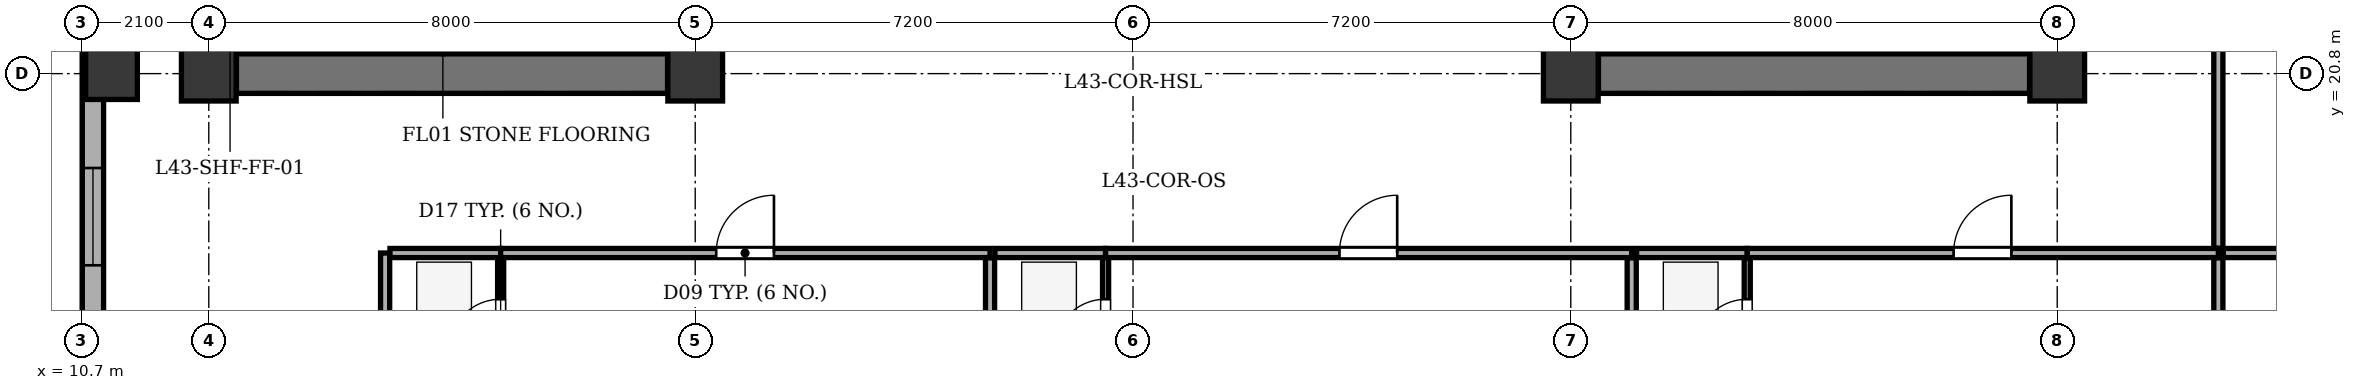
"""IFC4 building model, lengths in metres.
Left out: names, types, materials, properties, quantities, classifications, styles, units other than length and angle.
Written with IfcOpenShell. Run it as: python <this file> out.ifc"""

import sys

from ifc_helpers import new_model, si_unit, direction, frame, frame_2d, origin, origin_2d, place, context, subcontext, project, spatial, rectangle, extrude, element, fill, save


model = new_model("IFC4")
c1 = context("Model", 3, precision=1e-05, world=origin(), true_north=direction((0.0, 1.0)))
c2 = subcontext(c1, "Body", "Model", "MODEL_VIEW")
j1 = project(units=[si_unit("LENGTHUNIT", "METRE"), si_unit("PLANEANGLEUNIT", "RADIAN")], contexts=[c1])
p1 = place(None, origin())
s1 = spatial("IfcSite", under=j1, at=p1, CompositionType="ELEMENT")
p2 = place(p1, origin())
s2 = spatial("IfcBuilding", under=s1, at=p2, CompositionType="ELEMENT")
p3 = place(p2, frame((0.0, 0.0, 169.3)))
s3 = spatial("IfcBuildingStorey", under=s2, at=p3, CompositionType="ELEMENT", Elevation=169.3)
for number, where, z_axis, x_axis in (
    (1, (12.8, 20.8, 0.0), (0.0, 0.0, 1.0), (1.0, 0.0, 0.0)),
    (2, (20.8, 20.8, 0.0), (0.0, 0.0, 1.0), (1.0, 0.0, 0.0)),
    (3, (35.2, 20.8, 0.0), (0.0, 0.0, 1.0), (1.0, 0.0, 0.0)),
    (4, (43.2, 20.8, 0.0), (0.0, 0.0, 1.0), (1.0, 0.0, 0.0)),
):
    element("IfcColumn", number, at=place(p3, frame(where, z_axis=z_axis, x_axis=x_axis)), inside=s3, PredefinedType="COLUMN", context=c2, shape_type="SweptSolid", body=[
        extrude(rectangle(XDim=0.9, YDim=0.9, at=origin_2d()), origin(), (0.0, 0.0, 1.0), 3.5),
    ])
p4 = place(p3, frame((11.2, 20.8, 0.0), z_axis=(0.0, 0.0, 1.0), x_axis=(1.0, 0.0, 0.0)))
e5 = element("IfcColumn", 5, at=p4, inside=s3, PredefinedType="COLUMN", context=c2, shape_type="SweptSolid", body=[
    extrude(rectangle(XDim=0.85, YDim=0.85, at=origin_2d()), origin(), (0.0, 0.0, 1.0), 3.5),
])
p5 = place(p3, frame((10.895, 12.9, 0.0), z_axis=(0.0, 0.0, 1.0), x_axis=(0.0, 1.0, 0.0)))
e6 = element("IfcWall", 6, at=p5, inside=s3, PredefinedType="STANDARD", context=c2, shape_type="SweptSolid", body=[
    extrude(rectangle(XDim=35.0, YDim=0.35, at=frame_2d((17.5, 0.0))), origin(), (0.0, 0.0, 1.0), 2.785),
])
p6 = place(p5, frame((1.652, 0.0, 0.75)))
e7 = element("IfcOpeningElement", 7, at=p6, cuts=e6, PredefinedType="OPENING", context=c2, shape_type="SweptSolid", body=[
    extrude(rectangle(XDim=1.6, YDim=1.75, at=frame_2d((0.8, 0.875))), frame((0.0, 0.185, 0.0), z_axis=(0.0, -1.0, 0.0), x_axis=(1.0, 0.0, 0.0)), (0.0, 0.0, 1.0), 0.37),
])
p7 = place(p5, frame((4.748, 0.0, 0.75)))
e8 = element("IfcOpeningElement", 8, at=p7, cuts=e6, PredefinedType="OPENING", context=c2, shape_type="SweptSolid", body=[
    extrude(rectangle(XDim=1.6, YDim=1.75, at=frame_2d((0.8, 0.875))), frame((0.0, 0.185, 0.0), z_axis=(0.0, -1.0, 0.0), x_axis=(1.0, 0.0, 0.0)), (0.0, 0.0, 1.0), 0.37),
])
p8 = place(p5, frame((10.752, 0.0, 0.75)))
e9 = element("IfcOpeningElement", 9, at=p8, cuts=e6, PredefinedType="OPENING", context=c2, shape_type="SweptSolid", body=[
    extrude(rectangle(XDim=1.6, YDim=1.75, at=frame_2d((0.8, 0.875))), frame((0.0, 0.185, 0.0), z_axis=(0.0, -1.0, 0.0), x_axis=(1.0, 0.0, 0.0)), (0.0, 0.0, 1.0), 0.37),
])
p9 = place(p5, frame((15.998, 0.0, 0.75)))
e10 = element("IfcOpeningElement", 10, at=p9, cuts=e6, PredefinedType="OPENING", context=c2, shape_type="SweptSolid", body=[
    extrude(rectangle(XDim=2.1, YDim=1.75, at=frame_2d((1.05, 0.875))), frame((0.0, 0.185, 0.0), z_axis=(0.0, -1.0, 0.0), x_axis=(1.0, 0.0, 0.0)), (0.0, 0.0, 1.0), 0.37),
])
p10 = place(p5, frame((23.916, 0.0, 0.75)))
e11 = element("IfcOpeningElement", 11, at=p10, cuts=e6, PredefinedType="OPENING", context=c2, shape_type="SweptSolid", body=[
    extrude(rectangle(XDim=1.6, YDim=1.75, at=frame_2d((0.8, 0.875))), frame((0.0, 0.185, 0.0), z_axis=(0.0, -1.0, 0.0), x_axis=(1.0, 0.0, 0.0)), (0.0, 0.0, 1.0), 0.37),
])
p11 = place(p5, frame((29.834, 0.0, 0.75)))
e12 = element("IfcOpeningElement", 12, at=p11, cuts=e6, PredefinedType="OPENING", context=c2, shape_type="SweptSolid", body=[
    extrude(rectangle(XDim=2.1, YDim=1.75, at=frame_2d((1.05, 0.875))), frame((0.0, 0.185, 0.0), z_axis=(0.0, -1.0, 0.0), x_axis=(1.0, 0.0, 0.0)), (0.0, 0.0, 1.0), 0.37),
])
p12 = place(p3, frame((13.255, 20.8, 0.0), z_axis=(0.0, 0.0, 1.0), x_axis=(1.0, 0.0, 0.0)))
e13 = element("IfcWall", 13, at=p12, inside=s3, PredefinedType="SHEAR", context=c2, shape_type="SweptSolid", body=[
    extrude(rectangle(XDim=7.09, YDim=0.65, at=frame_2d((3.545, 0.0))), origin(), (0.0, 0.0, 1.0), 3.2),
])
p13 = place(p3, frame((16.435, 21.135, 0.0), z_axis=(0.0, 0.0, 1.0), x_axis=(0.0, 1.0, 0.0)))
e14 = element("IfcWall", 14, at=p13, inside=s3, PredefinedType="SHEAR", context=c2, shape_type="SweptSolid", body=[
    extrude(rectangle(XDim=12.13, YDim=0.25, at=frame_2d((6.065, 0.0))), origin(), (0.0, 0.0, 1.0), 3.2),
])
p14 = place(p13, frame((0.515, 0.0, 0.0)))
e15 = element("IfcOpeningElement", 15, at=p14, cuts=e14, PredefinedType="OPENING", context=c2, shape_type="SweptSolid", body=[
    extrude(rectangle(XDim=1.2, YDim=2.15, at=frame_2d((0.6, 1.075))), frame((0.0, 0.135, 0.0), z_axis=(0.0, -1.0, 0.0), x_axis=(1.0, 0.0, 0.0)), (0.0, 0.0, 1.0), 0.27),
])
p15 = place(p13, frame((2.665, 0.0, 0.0)))
e16 = element("IfcOpeningElement", 16, at=p15, cuts=e14, PredefinedType="OPENING", context=c2, shape_type="SweptSolid", body=[
    extrude(rectangle(XDim=1.15, YDim=2.15, at=frame_2d((0.575, 1.075))), frame((0.0, 0.135, 0.0), z_axis=(0.0, -1.0, 0.0), x_axis=(1.0, 0.0, 0.0)), (0.0, 0.0, 1.0), 0.27),
])
p16 = place(p3, frame((35.655, 20.8, 0.0), z_axis=(0.0, 0.0, 1.0), x_axis=(1.0, 0.0, 0.0)))
e17 = element("IfcWall", 17, at=p16, inside=s3, PredefinedType="SHEAR", context=c2, shape_type="SweptSolid", body=[
    extrude(rectangle(XDim=7.09, YDim=0.65, at=frame_2d((3.545, 0.0))), origin(), (0.0, 0.0, 1.0), 3.2),
])
p17 = place(p3, frame((39.565, 21.135, 0.0), z_axis=(0.0, 0.0, 1.0), x_axis=(0.0, 1.0, 0.0)))
e18 = element("IfcWall", 18, at=p17, inside=s3, PredefinedType="SHEAR", context=c2, shape_type="SweptSolid", body=[
    extrude(rectangle(XDim=12.13, YDim=0.25, at=frame_2d((6.065, 0.0))), origin(), (0.0, 0.0, 1.0), 3.2),
])
p18 = place(p17, frame((0.515, 0.0, 0.0)))
e19 = element("IfcOpeningElement", 19, at=p18, cuts=e18, PredefinedType="OPENING", context=c2, shape_type="SweptSolid", body=[
    extrude(rectangle(XDim=1.2, YDim=2.15, at=frame_2d((0.6, 1.075))), frame((0.0, 0.135, 0.0), z_axis=(0.0, -1.0, 0.0), x_axis=(1.0, 0.0, 0.0)), (0.0, 0.0, 1.0), 0.27),
])
p19 = place(p17, frame((2.665, 0.0, 0.0)))
e20 = element("IfcOpeningElement", 20, at=p19, cuts=e18, PredefinedType="OPENING", context=c2, shape_type="SweptSolid", body=[
    extrude(rectangle(XDim=1.15, YDim=2.15, at=frame_2d((0.575, 1.075))), frame((0.0, 0.135, 0.0), z_axis=(0.0, -1.0, 0.0), x_axis=(1.0, 0.0, 0.0)), (0.0, 0.0, 1.0), 0.27),
])
p20 = place(p3, frame((15.7, 8.275, 0.0), z_axis=(0.0, 0.0, 1.0), x_axis=(0.0, 1.0, 0.0)))
e21 = element("IfcWall", 21, at=p20, inside=s3, PredefinedType="PARTITIONING", context=c2, shape_type="SweptSolid", body=[
    extrude(rectangle(XDim=9.575, YDim=0.15, at=frame_2d((4.788, 0.0))), origin(), (0.0, 0.0, 1.0), 3.2),
])
p21 = place(p3, frame((15.78, 17.85, 0.0), z_axis=(0.0, 0.0, 1.0), x_axis=(1.0, 0.0, 0.0)))
e22 = element("IfcWall", 22, at=p21, inside=s3, PredefinedType="PARTITIONING", context=c2, shape_type="SweptSolid", body=[
    extrude(rectangle(XDim=1.82, YDim=0.15, at=frame_2d((0.91, 0.0))), origin(), (0.0, 0.0, 1.0), 3.2),
])
p22 = place(p3, frame((17.6, 17.85, 0.0), z_axis=(0.0, 0.0, 1.0), x_axis=(1.0, 0.0, 0.0)))
e23 = element("IfcWall", 23, at=p22, inside=s3, PredefinedType="PARTITIONING", context=c2, shape_type="SweptSolid", body=[
    extrude(rectangle(XDim=8.049, YDim=0.15, at=frame_2d((4.024, 0.0))), origin(), (0.0, 0.0, 1.0), 3.2),
])
p23 = place(p22, frame((3.545, 0.0, 0.0)))
e24 = element("IfcOpeningElement", 24, at=p23, cuts=e23, PredefinedType="OPENING", context=c2, shape_type="SweptSolid", body=[
    extrude(rectangle(XDim=0.95, YDim=2.1, at=frame_2d((0.475, 1.05))), frame((0.0, 0.085, 0.0), z_axis=(0.0, -1.0, 0.0), x_axis=(1.0, 0.0, 0.0)), (0.0, 0.0, 1.0), 0.17),
])
p24 = place(p3, frame((17.6, 15.52, 0.0), z_axis=(0.0, 0.0, 1.0), x_axis=(0.0, 1.0, 0.0)))
e25 = element("IfcWall", 25, at=p24, inside=s3, PredefinedType="PARTITIONING", context=c2, shape_type="SweptSolid", body=[
    extrude(rectangle(XDim=2.25, YDim=0.1, at=frame_2d((1.125, 0.0))), origin(), (0.0, 0.0, 1.0), 3.2),
])
p25 = place(p24, frame((0.72, 0.0, 0.0)))
e26 = element("IfcOpeningElement", 26, at=p25, cuts=e25, PredefinedType="OPENING", context=c2, shape_type="SweptSolid", body=[
    extrude(rectangle(XDim=0.85, YDim=2.05, at=frame_2d((0.425, 1.025))), frame((0.0, 0.06, 0.0), z_axis=(0.0, -1.0, 0.0), x_axis=(1.0, 0.0, 0.0)), (0.0, 0.0, 1.0), 0.12),
])
p26 = place(p3, frame((25.649, 8.275, 0.0), z_axis=(0.0, 0.0, 1.0), x_axis=(0.0, 1.0, 0.0)))
e27 = element("IfcWall", 27, at=p26, inside=s3, PredefinedType="PARTITIONING", context=c2, shape_type="SweptSolid", body=[
    extrude(rectangle(XDim=9.495, YDim=0.15, at=frame_2d((4.748, 0.0))), origin(), (0.0, 0.0, 1.0), 3.2),
])
p27 = place(p3, frame((25.729, 17.85, 0.0), z_axis=(0.0, 0.0, 1.0), x_axis=(1.0, 0.0, 0.0)))
e28 = element("IfcWall", 28, at=p27, inside=s3, PredefinedType="PARTITIONING", context=c2, shape_type="SweptSolid", body=[
    extrude(rectangle(XDim=1.82, YDim=0.15, at=frame_2d((0.91, 0.0))), origin(), (0.0, 0.0, 1.0), 3.2),
])
p28 = place(p3, frame((27.549, 17.85, 0.0), z_axis=(0.0, 0.0, 1.0), x_axis=(1.0, 0.0, 0.0)))
e29 = element("IfcWall", 29, at=p28, inside=s3, PredefinedType="PARTITIONING", context=c2, shape_type="SweptSolid", body=[
    extrude(rectangle(XDim=8.653, YDim=0.15, at=frame_2d((4.326, 0.0))), origin(), (0.0, 0.0, 1.0), 3.2),
])
p29 = place(p28, frame((3.846, 0.0, 0.0)))
e30 = element("IfcOpeningElement", 30, at=p29, cuts=e29, PredefinedType="OPENING", context=c2, shape_type="SweptSolid", body=[
    extrude(rectangle(XDim=0.95, YDim=2.1, at=frame_2d((0.475, 1.05))), frame((0.0, 0.085, 0.0), z_axis=(0.0, -1.0, 0.0), x_axis=(1.0, 0.0, 0.0)), (0.0, 0.0, 1.0), 0.17),
])
p30 = place(p3, frame((27.549, 15.52, 0.0), z_axis=(0.0, 0.0, 1.0), x_axis=(0.0, 1.0, 0.0)))
e31 = element("IfcWall", 31, at=p30, inside=s3, PredefinedType="PARTITIONING", context=c2, shape_type="SweptSolid", body=[
    extrude(rectangle(XDim=2.25, YDim=0.1, at=frame_2d((1.125, 0.0))), origin(), (0.0, 0.0, 1.0), 3.2),
])
p31 = place(p30, frame((0.72, 0.0, 0.0)))
e32 = element("IfcOpeningElement", 32, at=p31, cuts=e31, PredefinedType="OPENING", context=c2, shape_type="SweptSolid", body=[
    extrude(rectangle(XDim=0.85, YDim=2.05, at=frame_2d((0.425, 1.025))), frame((0.0, 0.06, 0.0), z_axis=(0.0, -1.0, 0.0), x_axis=(1.0, 0.0, 0.0)), (0.0, 0.0, 1.0), 0.12),
])
p32 = place(p3, frame((36.202, 8.275, 0.0), z_axis=(0.0, 0.0, 1.0), x_axis=(0.0, 1.0, 0.0)))
e33 = element("IfcWall", 33, at=p32, inside=s3, PredefinedType="PARTITIONING", context=c2, shape_type="SweptSolid", body=[
    extrude(rectangle(XDim=9.495, YDim=0.15, at=frame_2d((4.748, 0.0))), origin(), (0.0, 0.0, 1.0), 3.2),
])
p33 = place(p3, frame((36.282, 17.85, 0.0), z_axis=(0.0, 0.0, 1.0), x_axis=(1.0, 0.0, 0.0)))
e34 = element("IfcWall", 34, at=p33, inside=s3, PredefinedType="PARTITIONING", context=c2, shape_type="SweptSolid", body=[
    extrude(rectangle(XDim=1.82, YDim=0.15, at=frame_2d((0.91, 0.0))), origin(), (0.0, 0.0, 1.0), 3.2),
])
p34 = place(p3, frame((38.102, 17.85, 0.0), z_axis=(0.0, 0.0, 1.0), x_axis=(1.0, 0.0, 0.0)))
e35 = element("IfcWall", 35, at=p34, inside=s3, PredefinedType="PARTITIONING", context=c2, shape_type="SweptSolid", body=[
    extrude(rectangle(XDim=7.748, YDim=0.15, at=frame_2d((3.874, 0.0))), origin(), (0.0, 0.0, 1.0), 3.2),
])
p35 = place(p34, frame((3.394, 0.0, 0.0)))
e36 = element("IfcOpeningElement", 36, at=p35, cuts=e35, PredefinedType="OPENING", context=c2, shape_type="SweptSolid", body=[
    extrude(rectangle(XDim=0.95, YDim=2.1, at=frame_2d((0.475, 1.05))), frame((0.0, 0.085, 0.0), z_axis=(0.0, -1.0, 0.0), x_axis=(1.0, 0.0, 0.0)), (0.0, 0.0, 1.0), 0.17),
])
p36 = place(p3, frame((38.102, 15.52, 0.0), z_axis=(0.0, 0.0, 1.0), x_axis=(0.0, 1.0, 0.0)))
e37 = element("IfcWall", 37, at=p36, inside=s3, PredefinedType="PARTITIONING", context=c2, shape_type="SweptSolid", body=[
    extrude(rectangle(XDim=2.25, YDim=0.1, at=frame_2d((1.125, 0.0))), origin(), (0.0, 0.0, 1.0), 3.2),
])
p37 = place(p36, frame((0.72, 0.0, 0.0)))
e38 = element("IfcOpeningElement", 38, at=p37, cuts=e37, PredefinedType="OPENING", context=c2, shape_type="SweptSolid", body=[
    extrude(rectangle(XDim=0.85, YDim=2.05, at=frame_2d((0.425, 1.025))), frame((0.0, 0.06, 0.0), z_axis=(0.0, -1.0, 0.0), x_axis=(1.0, 0.0, 0.0)), (0.0, 0.0, 1.0), 0.12),
])
p38 = place(p3, frame((45.85, 8.275, 0.0), z_axis=(0.0, 0.0, 1.0), x_axis=(0.0, 1.0, 0.0)))
e39 = element("IfcWall", 39, at=p38, inside=s3, PredefinedType="PARTITIONING", context=c2, shape_type="SweptSolid", body=[
    extrude(rectangle(XDim=9.495, YDim=0.15, at=frame_2d((4.748, 0.0))), origin(), (0.0, 0.0, 1.0), 3.2),
])
p39 = place(p3, frame((45.93, 17.85, 0.0), z_axis=(0.0, 0.0, 1.0), x_axis=(1.0, 0.0, 0.0)))
e40 = element("IfcWall", 40, at=p39, inside=s3, PredefinedType="PARTITIONING", context=c2, shape_type="SweptSolid", body=[
    extrude(rectangle(XDim=9.395, YDim=0.15, at=frame_2d((4.698, 0.0))), origin(), (0.0, 0.0, 1.0), 3.2),
])
p40 = place(p3, frame((45.85, 17.93, 0.0), z_axis=(0.0, 0.0, 1.0), x_axis=(0.0, 1.0, 0.0)))
e41 = element("IfcWall", 41, at=p40, inside=s3, PredefinedType="PARTITIONING", context=c2, shape_type="SweptSolid", body=[
    extrude(rectangle(XDim=18.54, YDim=0.15, at=frame_2d((9.27, 0.0))), origin(), (0.0, 0.0, 1.0), 3.2),
])
p41 = place(p40, frame((8.79, 0.0, 0.0)))
e42 = element("IfcOpeningElement", 42, at=p41, cuts=e41, PredefinedType="OPENING", context=c2, shape_type="SweptSolid", body=[
    extrude(rectangle(XDim=0.95, YDim=2.1, at=frame_2d((0.475, 1.05))), frame((0.0, 0.085, 0.0), z_axis=(0.0, -1.0, 0.0), x_axis=(1.0, 0.0, 0.0)), (0.0, 0.0, 1.0), 0.17),
])
p42 = place(p7, origin())
e43 = element("IfcWindow", 43, at=p42, inside=s3, PartitioningType="SINGLE_PANEL", PredefinedType="WINDOW", context=c2, shape_type="SweptSolid", body=[
    extrude(rectangle(XDim=1.6, YDim=1.75, at=frame_2d((0.8, 0.875))), frame((0.0, -0.01, 0.0), z_axis=(0.0, -1.0, 0.0), x_axis=(1.0, 0.0, 0.0)), (0.0, 0.0, 1.0), 0.06),
])
fill(e8, e43)
p43 = place(p25, origin())
e44 = element("IfcDoor", 44, at=p43, inside=s3, OperationType="SINGLE_SWING_LEFT", PredefinedType="DOOR", context=c2, shape_type="SweptSolid", body=[
    extrude(rectangle(XDim=0.85, YDim=2.05, at=frame_2d((0.425, 1.025))), frame((0.0, 0.025, 0.0), z_axis=(0.0, -1.0, 0.0), x_axis=(1.0, 0.0, 0.0)), (0.0, 0.0, 1.0), 0.05),
])
fill(e26, e44)
p44 = place(p23, origin())
e45 = element("IfcDoor", 45, at=p44, inside=s3, OperationType="SINGLE_SWING_RIGHT", PredefinedType="DOOR", context=c2, shape_type="SweptSolid", body=[
    extrude(rectangle(XDim=0.95, YDim=2.1, at=frame_2d((0.475, 1.05))), frame((0.0, 0.025, 0.0), z_axis=(0.0, -1.0, 0.0), x_axis=(1.0, 0.0, 0.0)), (0.0, 0.0, 1.0), 0.05),
])
fill(e24, e45)
p45 = place(p31, origin())
e46 = element("IfcDoor", 46, at=p45, inside=s3, OperationType="SINGLE_SWING_LEFT", PredefinedType="DOOR", context=c2, shape_type="SweptSolid", body=[
    extrude(rectangle(XDim=0.85, YDim=2.05, at=frame_2d((0.425, 1.025))), frame((0.0, 0.025, 0.0), z_axis=(0.0, -1.0, 0.0), x_axis=(1.0, 0.0, 0.0)), (0.0, 0.0, 1.0), 0.05),
])
fill(e32, e46)
p46 = place(p29, origin())
e47 = element("IfcDoor", 47, at=p46, inside=s3, OperationType="SINGLE_SWING_RIGHT", PredefinedType="DOOR", context=c2, shape_type="SweptSolid", body=[
    extrude(rectangle(XDim=0.95, YDim=2.1, at=frame_2d((0.475, 1.05))), frame((0.0, 0.025, 0.0), z_axis=(0.0, -1.0, 0.0), x_axis=(1.0, 0.0, 0.0)), (0.0, 0.0, 1.0), 0.05),
])
fill(e30, e47)
p47 = place(p37, origin())
e48 = element("IfcDoor", 48, at=p47, inside=s3, OperationType="SINGLE_SWING_LEFT", PredefinedType="DOOR", context=c2, shape_type="SweptSolid", body=[
    extrude(rectangle(XDim=0.85, YDim=2.05, at=frame_2d((0.425, 1.025))), frame((0.0, 0.025, 0.0), z_axis=(0.0, -1.0, 0.0), x_axis=(1.0, 0.0, 0.0)), (0.0, 0.0, 1.0), 0.05),
])
fill(e38, e48)
p48 = place(p35, origin())
e49 = element("IfcDoor", 49, at=p48, inside=s3, OperationType="SINGLE_SWING_RIGHT", PredefinedType="DOOR", context=c2, shape_type="SweptSolid", body=[
    extrude(rectangle(XDim=0.95, YDim=2.1, at=frame_2d((0.475, 1.05))), frame((0.0, 0.025, 0.0), z_axis=(0.0, -1.0, 0.0), x_axis=(1.0, 0.0, 0.0)), (0.0, 0.0, 1.0), 0.05),
])
fill(e36, e49)
save(model, sys.argv[1])
